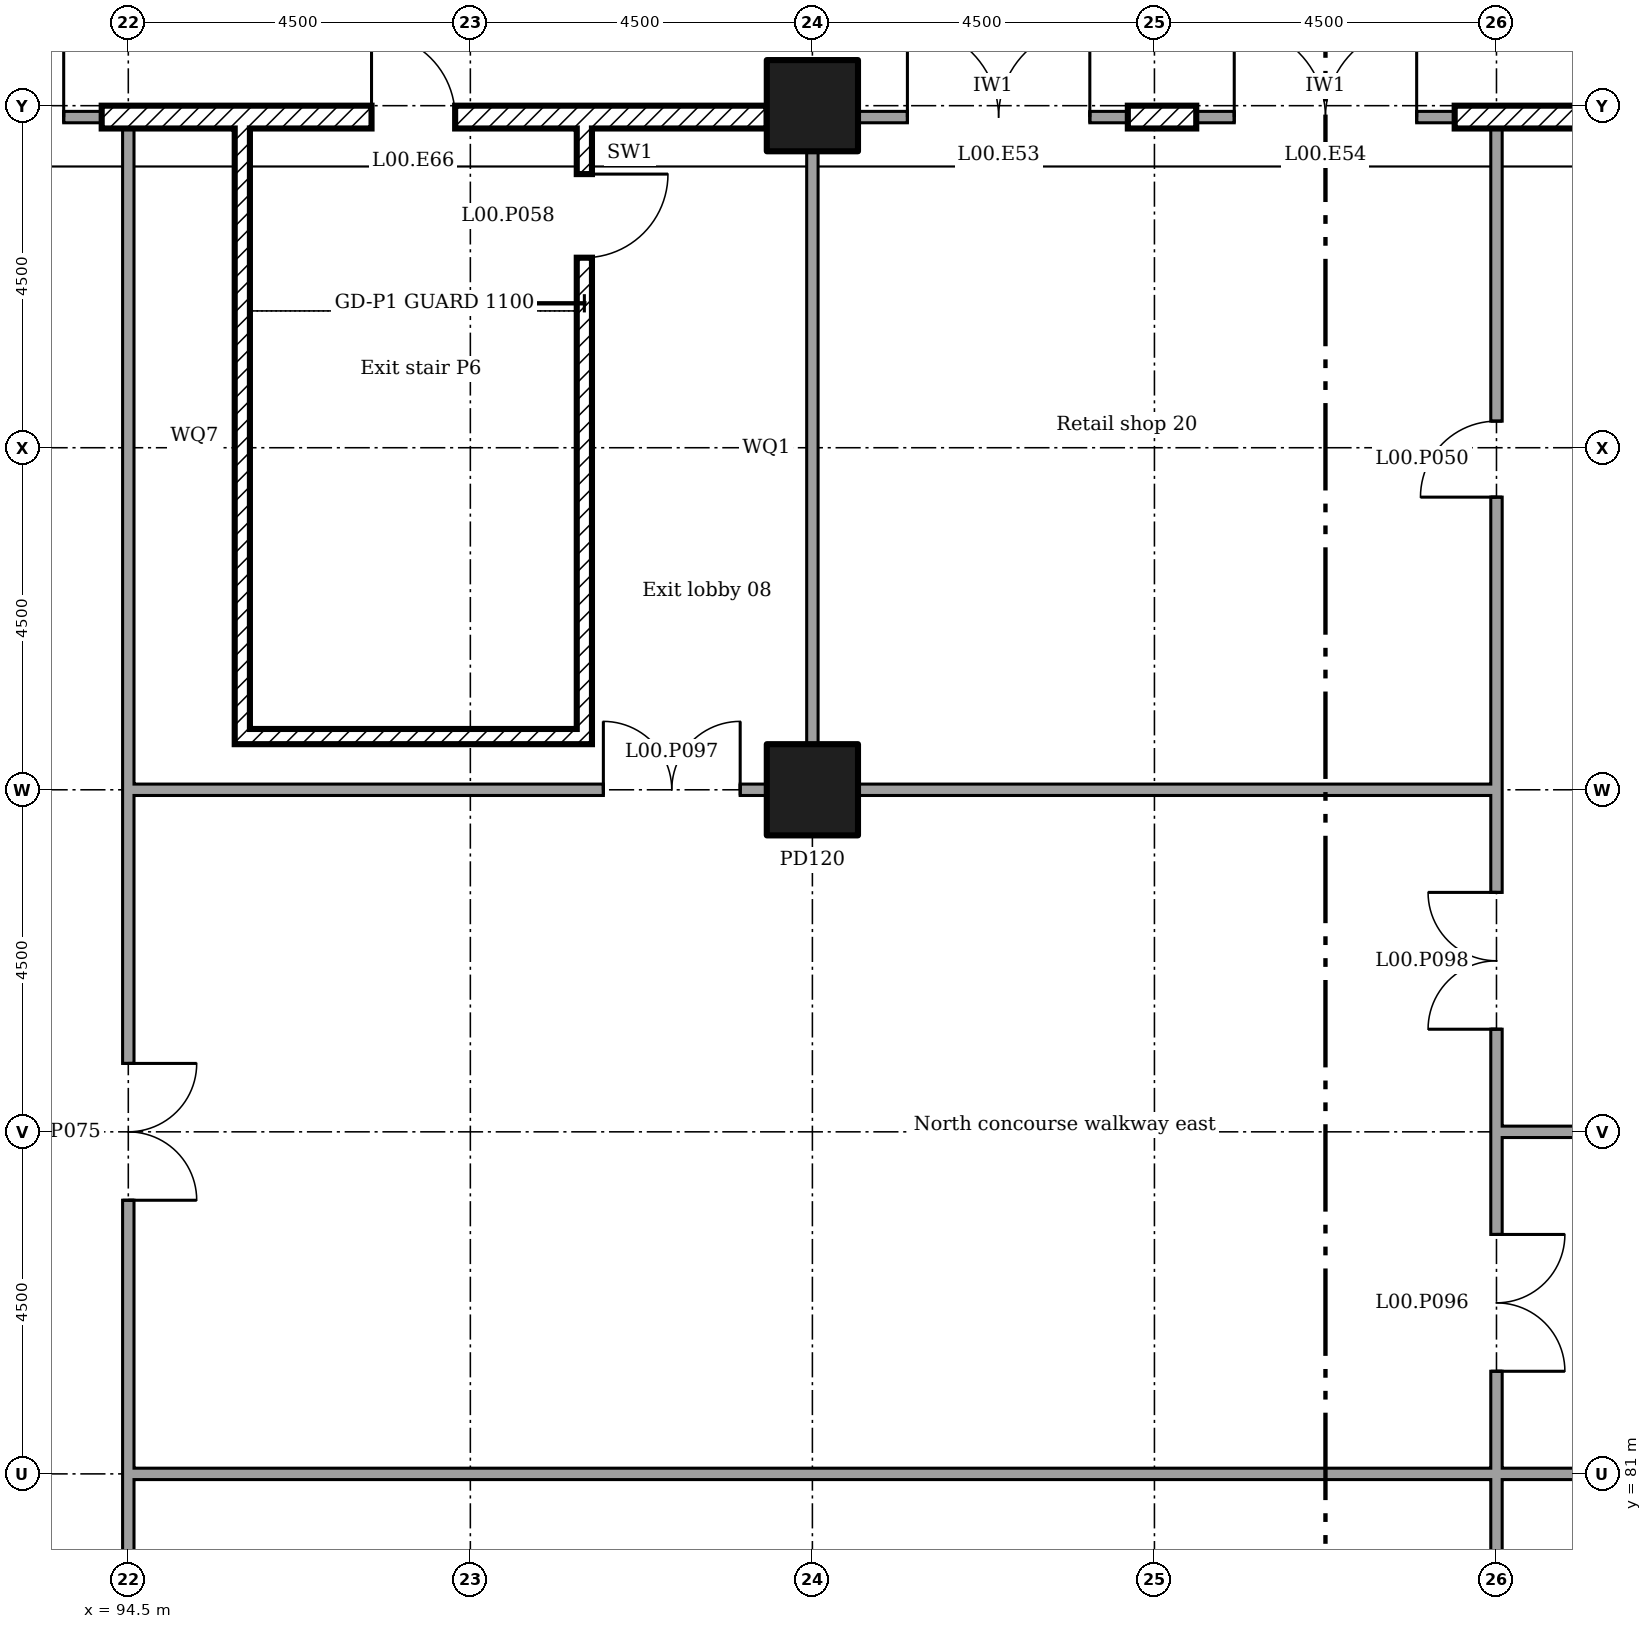
"""IFC4 building model, lengths in metres.
Left out: names, types, materials, properties, quantities, classifications, styles, units other than length and angle.
Written with IfcOpenShell. Run it as: python <this file> out.ifc"""

import sys

from ifc_helpers import new_model, si_unit, direction, frame, frame_2d, origin, origin_2d, place, context, subcontext, project, spatial, rectangle, extrude, element, fill, save


model = new_model("IFC4")
c1 = context("Model", 3, precision=1e-05, world=origin(), true_north=direction((0.0, 1.0)))
c2 = subcontext(c1, "Body", "Model", "MODEL_VIEW")
j1 = project(units=[si_unit("LENGTHUNIT", "METRE"), si_unit("PLANEANGLEUNIT", "RADIAN")], contexts=[c1])
p1 = place(None, origin())
s1 = spatial("IfcSite", under=j1, at=p1, CompositionType="ELEMENT")
p2 = place(p1, origin())
s2 = spatial("IfcBuilding", under=s1, at=p2, CompositionType="ELEMENT")
p3 = place(p2, origin())
s3 = spatial("IfcBuildingStorey", under=s2, at=p3, CompositionType="ELEMENT", Elevation=0.0)
for number, where in (
    (1, (103.5, 90.0, 0.0)),
    (2, (103.5, 99.0, 0.0)),
):
    element("IfcColumn", number, at=place(p3, frame(where)), inside=s3, PredefinedType="COLUMN", context=c2, shape_type="SweptSolid", body=[
        extrude(rectangle(XDim=1.2, YDim=1.2, at=origin_2d()), origin(), (0.0, 0.0, 1.0), 6.0),
    ])
p4 = place(p3, frame((116.4, 98.85, 0.0), z_axis=(0.0, 0.0, 1.0), x_axis=(-1.0, 0.0, 0.0)))
e3 = element("IfcWall", 3, at=p4, inside=s3, PredefinedType="ELEMENTEDWALL", context=c2, shape_type="SweptSolid", body=[
    extrude(rectangle(XDim=4.45, YDim=0.3, at=frame_2d((2.225, 0.0))), origin(), (0.0, 0.0, 1.0), 5.55),
])
p5 = place(p3, frame((111.95, 98.85, 0.0), z_axis=(0.0, 0.0, 1.0), x_axis=(-1.0, 0.0, 0.0)))
e4 = element("IfcWall", 4, at=p5, inside=s3, PredefinedType="SOLIDWALL", context=c2, shape_type="SweptSolid", body=[
    extrude(rectangle(XDim=3.4, YDim=0.15, at=frame_2d((1.7, 0.0))), origin(), (0.0, 0.0, 1.0), 5.55),
])
p6 = place(p5, frame((0.5, 0.0, 0.0)))
e5 = element("IfcOpeningElement", 5, at=p6, cuts=e4, PredefinedType="OPENING", context=c2, shape_type="SweptSolid", body=[
    extrude(rectangle(XDim=2.4, YDim=2.7, at=frame_2d((1.2, 1.35))), frame((0.0, 0.085, 0.0), z_axis=(0.0, -1.0, 0.0), x_axis=(1.0, 0.0, 0.0)), (0.0, 0.0, 1.0), 0.17),
])
p7 = place(p3, frame((108.55, 98.85, 0.0), z_axis=(0.0, 0.0, 1.0), x_axis=(-1.0, 0.0, 0.0)))
e6 = element("IfcWall", 6, at=p7, inside=s3, PredefinedType="ELEMENTEDWALL", context=c2, shape_type="SweptSolid", body=[
    extrude(rectangle(XDim=0.9, YDim=0.3, at=frame_2d((0.45, 0.0))), origin(), (0.0, 0.0, 1.0), 5.55),
])
p8 = place(p3, frame((107.65, 98.85, 0.0), z_axis=(0.0, 0.0, 1.0), x_axis=(-1.0, 0.0, 0.0)))
e7 = element("IfcWall", 7, at=p8, inside=s3, PredefinedType="SOLIDWALL", context=c2, shape_type="SweptSolid", body=[
    extrude(rectangle(XDim=3.55, YDim=0.15, at=frame_2d((1.775, 0.0))), origin(), (0.0, 0.0, 1.0), 5.55),
])
p9 = place(p8, frame((0.5, 0.0, 0.0)))
e8 = element("IfcOpeningElement", 8, at=p9, cuts=e7, PredefinedType="OPENING", context=c2, shape_type="SweptSolid", body=[
    extrude(rectangle(XDim=2.4, YDim=2.7, at=frame_2d((1.2, 1.35))), frame((0.0, 0.085, 0.0), z_axis=(0.0, -1.0, 0.0), x_axis=(1.0, 0.0, 0.0)), (0.0, 0.0, 1.0), 0.17),
])
p10 = place(p3, frame((102.9, 98.85, 0.0), z_axis=(0.0, 0.0, 1.0), x_axis=(-1.0, 0.0, 0.0)))
e9 = element("IfcWall", 9, at=p10, inside=s3, PredefinedType="ELEMENTEDWALL", context=c2, shape_type="SweptSolid", body=[
    extrude(rectangle(XDim=3.6, YDim=0.3, at=frame_2d((1.8, 0.0))), origin(), (0.0, 0.0, 1.0), 5.55),
])
p11 = place(p3, frame((99.3, 98.85, 0.0), z_axis=(0.0, 0.0, 1.0), x_axis=(-1.0, 0.0, 0.0)))
e10 = element("IfcWall", 10, at=p11, inside=s3, PredefinedType="ELEMENTEDWALL", context=c2, shape_type="SweptSolid", body=[
    extrude(rectangle(XDim=2.1, YDim=0.3, at=frame_2d((1.05, 0.0))), origin(), (0.0, 0.0, 1.0), 5.55),
])
p12 = place(p11, frame((0.5, 0.0, 0.0)))
e11 = element("IfcOpeningElement", 11, at=p12, cuts=e10, PredefinedType="OPENING", context=c2, shape_type="SweptSolid", body=[
    extrude(rectangle(XDim=1.1, YDim=2.4, at=frame_2d((0.55, 1.2))), frame((0.0, 0.16, 0.0), z_axis=(0.0, -1.0, 0.0), x_axis=(1.0, 0.0, 0.0)), (0.0, 0.0, 1.0), 0.32),
])
p13 = place(p3, frame((97.2, 98.85, 0.0), z_axis=(0.0, 0.0, 1.0), x_axis=(-1.0, 0.0, 0.0)))
e12 = element("IfcWall", 12, at=p13, inside=s3, PredefinedType="ELEMENTEDWALL", context=c2, shape_type="SweptSolid", body=[
    extrude(rectangle(XDim=3.05, YDim=0.3, at=frame_2d((1.525, 0.0))), origin(), (0.0, 0.0, 1.0), 5.55),
])
p14 = place(p3, frame((94.15, 98.85, 0.0), z_axis=(0.0, 0.0, 1.0), x_axis=(-1.0, 0.0, 0.0)))
e13 = element("IfcWall", 13, at=p14, inside=s3, PredefinedType="SOLIDWALL", context=c2, shape_type="SweptSolid", body=[
    extrude(rectangle(XDim=3.55, YDim=0.15, at=frame_2d((1.775, 0.0))), origin(), (0.0, 0.0, 1.0), 5.55),
])
p15 = place(p14, frame((0.5, 0.0, 0.0)))
e14 = element("IfcOpeningElement", 14, at=p15, cuts=e13, PredefinedType="OPENING", context=c2, shape_type="SweptSolid", body=[
    extrude(rectangle(XDim=2.4, YDim=2.7, at=frame_2d((1.2, 1.35))), frame((0.0, 0.085, 0.0), z_axis=(0.0, -1.0, 0.0), x_axis=(1.0, 0.0, 0.0)), (0.0, 0.0, 1.0), 0.17),
])
p16 = place(p3, frame((94.5, 76.5, 0.0), z_axis=(0.0, 0.0, 1.0), x_axis=(0.0, 1.0, 0.0)))
e15 = element("IfcWall", 15, at=p16, inside=s3, PredefinedType="PARTITIONING", context=c2, shape_type="SweptSolid", body=[
    extrude(rectangle(XDim=4.575, YDim=0.15, at=frame_2d((2.288, 0.0))), origin(), (0.0, 0.0, 1.0), 5.55),
])
p17 = place(p3, frame((94.5, 81.0, 0.0), z_axis=(0.0, 0.0, 1.0), x_axis=(0.0, 1.0, 0.0)))
e16 = element("IfcWall", 16, at=p17, inside=s3, PredefinedType="PARTITIONING", context=c2, shape_type="SweptSolid", body=[
    extrude(rectangle(XDim=9.075, YDim=0.15, at=frame_2d((4.538, 0.0))), origin(), (0.0, 0.0, 1.0), 5.55),
])
p18 = place(p17, frame((3.6, 0.0, 0.0)))
e17 = element("IfcOpeningElement", 17, at=p18, cuts=e16, PredefinedType="OPENING", context=c2, shape_type="SweptSolid", body=[
    extrude(rectangle(XDim=1.8, YDim=2.1, at=frame_2d((0.9, 1.05))), frame((0.0, 0.085, 0.0), z_axis=(0.0, -1.0, 0.0), x_axis=(1.0, 0.0, 0.0)), (0.0, 0.0, 1.0), 0.17),
])
p19 = place(p3, frame((94.5, 90.0, 0.0), z_axis=(0.0, 0.0, 1.0), x_axis=(0.0, 1.0, 0.0)))
e18 = element("IfcWall", 18, at=p19, inside=s3, PredefinedType="PARTITIONING", context=c2, shape_type="SweptSolid", body=[
    extrude(rectangle(XDim=8.7, YDim=0.15, at=frame_2d((4.35, 0.0))), origin(), (0.0, 0.0, 1.0), 5.55),
])
p20 = place(p3, frame((112.5, 59.495, 0.0), z_axis=(0.0, 0.0, 1.0), x_axis=(0.0, 1.0, 0.0)))
e19 = element("IfcWall", 19, at=p20, inside=s3, PredefinedType="PARTITIONING", context=c2, shape_type="SweptSolid", body=[
    extrude(rectangle(XDim=21.58, YDim=0.15, at=frame_2d((10.79, 0.0))), origin(), (0.0, 0.0, 1.0), 5.55),
])
p21 = place(p3, frame((94.575, 81.0, 0.0)))
e20 = element("IfcWall", 20, at=p21, inside=s3, PredefinedType="PARTITIONING", context=c2, shape_type="SweptSolid", body=[
    extrude(rectangle(XDim=17.85, YDim=0.15, at=frame_2d((8.925, 0.0))), origin(), (0.0, 0.0, 1.0), 5.55),
])
p22 = place(p3, frame((112.425, 81.0, 0.0)))
e21 = element("IfcWall", 21, at=p22, inside=s3, PredefinedType="PARTITIONING", context=c2, shape_type="SweptSolid", body=[
    extrude(rectangle(XDim=22.5, YDim=0.15, at=frame_2d((11.25, 0.0))), origin(), (0.0, 0.0, 1.0), 5.55),
])
p23 = place(p3, frame((112.5, 81.075, 0.0), z_axis=(0.0, 0.0, 1.0), x_axis=(0.0, 1.0, 0.0)))
e22 = element("IfcWall", 22, at=p23, inside=s3, PredefinedType="PARTITIONING", context=c2, shape_type="SweptSolid", body=[
    extrude(rectangle(XDim=4.5, YDim=0.15, at=frame_2d((2.25, 0.0))), origin(), (0.0, 0.0, 1.0), 5.55),
])
p24 = place(p23, frame((1.275, 0.0, 0.0)))
e23 = element("IfcOpeningElement", 23, at=p24, cuts=e22, PredefinedType="OPENING", context=c2, shape_type="SweptSolid", body=[
    extrude(rectangle(XDim=1.8, YDim=2.1, at=frame_2d((0.9, 1.05))), frame((0.0, 0.085, 0.0), z_axis=(0.0, -1.0, 0.0), x_axis=(1.0, 0.0, 0.0)), (0.0, 0.0, 1.0), 0.17),
])
p25 = place(p3, frame((94.575, 90.0, 0.0)))
e24 = element("IfcWall", 24, at=p25, inside=s3, PredefinedType="PARTITIONING", context=c2, shape_type="SweptSolid", body=[
    extrude(rectangle(XDim=8.33, YDim=0.15, at=frame_2d((4.165, 0.0))), origin(), (0.0, 0.0, 1.0), 5.55),
])
p26 = place(p25, frame((6.175, 0.0, 0.0)))
e25 = element("IfcOpeningElement", 25, at=p26, cuts=e24, PredefinedType="OPENING", context=c2, shape_type="SweptSolid", body=[
    extrude(rectangle(XDim=1.8, YDim=2.1, at=frame_2d((0.9, 1.05))), frame((0.0, 0.085, 0.0), z_axis=(0.0, -1.0, 0.0), x_axis=(1.0, 0.0, 0.0)), (0.0, 0.0, 1.0), 0.17),
])
p27 = place(p3, frame((104.095, 90.0, 0.0)))
e26 = element("IfcWall", 26, at=p27, inside=s3, PredefinedType="PARTITIONING", context=c2, shape_type="SweptSolid", body=[
    extrude(rectangle(XDim=8.48, YDim=0.15, at=frame_2d((4.24, 0.0))), origin(), (0.0, 0.0, 1.0), 5.55),
])
p28 = place(p3, frame((112.5, 85.5, 0.0), z_axis=(0.0, 0.0, 1.0), x_axis=(0.0, 1.0, 0.0)))
e27 = element("IfcWall", 27, at=p28, inside=s3, PredefinedType="PARTITIONING", context=c2, shape_type="SweptSolid", body=[
    extrude(rectangle(XDim=4.425, YDim=0.15, at=frame_2d((2.212, 0.0))), origin(), (0.0, 0.0, 1.0), 5.55),
])
p29 = place(p28, frame((1.35, 0.0, 0.0)))
e28 = element("IfcOpeningElement", 28, at=p29, cuts=e27, PredefinedType="OPENING", context=c2, shape_type="SweptSolid", body=[
    extrude(rectangle(XDim=1.8, YDim=2.1, at=frame_2d((0.9, 1.05))), frame((0.0, 0.085, 0.0), z_axis=(0.0, -1.0, 0.0), x_axis=(1.0, 0.0, 0.0)), (0.0, 0.0, 1.0), 0.17),
])
p30 = place(p3, frame((112.575, 85.5, 0.0)))
e29 = element("IfcWall", 29, at=p30, inside=s3, PredefinedType="PARTITIONING", context=c2, shape_type="SweptSolid", body=[
    extrude(rectangle(XDim=18.0, YDim=0.15, at=frame_2d((9.0, 0.0))), origin(), (0.0, 0.0, 1.0), 5.55),
])
p31 = place(p30, frame((8.025, 0.0, 0.0)))
e30 = element("IfcOpeningElement", 30, at=p31, cuts=e29, PredefinedType="OPENING", context=c2, shape_type="SweptSolid", body=[
    extrude(rectangle(XDim=1.8, YDim=2.1, at=frame_2d((0.9, 1.05))), frame((0.0, 0.085, 0.0), z_axis=(0.0, -1.0, 0.0), x_axis=(1.0, 0.0, 0.0)), (0.0, 0.0, 1.0), 0.17),
])
p32 = place(p3, frame((103.5, 90.595, 0.0), z_axis=(0.0, 0.0, 1.0), x_axis=(0.0, 1.0, 0.0)))
e31 = element("IfcWall", 31, at=p32, inside=s3, PredefinedType="PARTITIONING", context=c2, shape_type="SweptSolid", body=[
    extrude(rectangle(XDim=7.81, YDim=0.15, at=frame_2d((3.905, 0.0))), origin(), (0.0, 0.0, 1.0), 5.55),
])
p33 = place(p3, frame((96.0, 90.6, 0.0), z_axis=(0.0, 0.0, 1.0), x_axis=(0.0, 1.0, 0.0)))
e32 = element("IfcWall", 32, at=p33, inside=s3, PredefinedType="SOLIDWALL", context=c2, shape_type="SweptSolid", body=[
    extrude(rectangle(XDim=8.1, YDim=0.2, at=frame_2d((4.05, 0.0))), origin(), (0.0, 0.0, 1.0), 5.55),
])
p34 = place(p3, frame((100.5, 90.6, 0.0), z_axis=(0.0, 0.0, 1.0), x_axis=(0.0, 1.0, 0.0)))
e33 = element("IfcWall", 33, at=p34, inside=s3, PredefinedType="SOLIDWALL", context=c2, shape_type="SweptSolid", body=[
    extrude(rectangle(XDim=8.1, YDim=0.2, at=frame_2d((4.05, 0.0))), origin(), (0.0, 0.0, 1.0), 5.55),
])
p35 = place(p34, frame((6.4, 0.0, 0.0)))
e34 = element("IfcOpeningElement", 34, at=p35, cuts=e33, PredefinedType="OPENING", context=c2, shape_type="SweptSolid", body=[
    extrude(rectangle(XDim=1.1, YDim=2.1, at=frame_2d((0.55, 1.05))), frame((0.0, 0.11, 0.0), z_axis=(0.0, -1.0, 0.0), x_axis=(1.0, 0.0, 0.0)), (0.0, 0.0, 1.0), 0.22),
])
p36 = place(p3, frame((96.1, 90.7, 0.0)))
e35 = element("IfcWall", 35, at=p36, inside=s3, PredefinedType="SOLIDWALL", context=c2, shape_type="SweptSolid", body=[
    extrude(rectangle(XDim=4.3, YDim=0.2, at=frame_2d((2.15, 0.0))), origin(), (0.0, 0.0, 1.0), 5.55),
])
p37 = place(p3, frame((112.5, 90.0, 0.0), z_axis=(0.0, 0.0, 1.0), x_axis=(0.0, 1.0, 0.0)))
e36 = element("IfcWall", 36, at=p37, inside=s3, PredefinedType="PARTITIONING", context=c2, shape_type="SweptSolid", body=[
    extrude(rectangle(XDim=8.7, YDim=0.15, at=frame_2d((4.35, 0.0))), origin(), (0.0, 0.0, 1.0), 5.55),
])
p38 = place(p37, frame((3.85, 0.0, 0.0)))
e37 = element("IfcOpeningElement", 37, at=p38, cuts=e36, PredefinedType="OPENING", context=c2, shape_type="SweptSolid", body=[
    extrude(rectangle(XDim=1.0, YDim=2.1, at=frame_2d((0.5, 1.05))), frame((0.0, 0.085, 0.0), z_axis=(0.0, -1.0, 0.0), x_axis=(1.0, 0.0, 0.0)), (0.0, 0.0, 1.0), 0.17),
])
p39 = place(p6, frame((2.4, 0.0, 0.0), x_axis=(-1.0, 0.0, 0.0)))
e38 = element("IfcDoor", 38, at=p39, inside=s3, OperationType="DOUBLE_DOOR_DOUBLE_SWING", PredefinedType="NOTDEFINED", context=c2, shape_type="SweptSolid", body=[
    extrude(rectangle(XDim=2.4, YDim=2.7, at=frame_2d((1.2, 1.35))), frame((0.0, 0.025, 0.0), z_axis=(0.0, -1.0, 0.0), x_axis=(1.0, 0.0, 0.0)), (0.0, 0.0, 1.0), 0.05),
])
fill(e5, e38)
p40 = place(p9, frame((2.4, 0.0, 0.0), x_axis=(-1.0, 0.0, 0.0)))
e39 = element("IfcDoor", 39, at=p40, inside=s3, OperationType="DOUBLE_DOOR_DOUBLE_SWING", PredefinedType="NOTDEFINED", context=c2, shape_type="SweptSolid", body=[
    extrude(rectangle(XDim=2.4, YDim=2.7, at=frame_2d((1.2, 1.35))), frame((0.0, 0.025, 0.0), z_axis=(0.0, -1.0, 0.0), x_axis=(1.0, 0.0, 0.0)), (0.0, 0.0, 1.0), 0.05),
])
fill(e8, e39)
p41 = place(p12, frame((1.1, 0.0, 0.0), x_axis=(-1.0, 0.0, 0.0)))
e40 = element("IfcDoor", 40, at=p41, inside=s3, OperationType="SINGLE_SWING_RIGHT", PredefinedType="NOTDEFINED", context=c2, shape_type="SweptSolid", body=[
    extrude(rectangle(XDim=1.1, YDim=2.4, at=frame_2d((0.55, 1.2))), frame((0.0, 0.025, 0.0), z_axis=(0.0, -1.0, 0.0), x_axis=(1.0, 0.0, 0.0)), (0.0, 0.0, 1.0), 0.05),
])
fill(e11, e40)
p42 = place(p15, frame((2.4, 0.0, 0.0), x_axis=(-1.0, 0.0, 0.0)))
e41 = element("IfcDoor", 41, at=p42, inside=s3, OperationType="DOUBLE_DOOR_DOUBLE_SWING", PredefinedType="NOTDEFINED", context=c2, shape_type="SweptSolid", body=[
    extrude(rectangle(XDim=2.4, YDim=2.7, at=frame_2d((1.2, 1.35))), frame((0.0, 0.025, 0.0), z_axis=(0.0, -1.0, 0.0), x_axis=(1.0, 0.0, 0.0)), (0.0, 0.0, 1.0), 0.05),
])
fill(e14, e41)
p43 = place(p38, origin())
e42 = element("IfcDoor", 42, at=p43, inside=s3, OperationType="SINGLE_SWING_RIGHT", PredefinedType="DOOR", context=c2, shape_type="SweptSolid", body=[
    extrude(rectangle(XDim=1.0, YDim=2.1, at=frame_2d((0.5, 1.05))), frame((0.0, 0.025, 0.0), z_axis=(0.0, -1.0, 0.0), x_axis=(1.0, 0.0, 0.0)), (0.0, 0.0, 1.0), 0.05),
])
fill(e37, e42)
p44 = place(p35, frame((1.1, 0.0, 0.0), x_axis=(-1.0, 0.0, 0.0)))
e43 = element("IfcDoor", 43, at=p44, inside=s3, OperationType="SINGLE_SWING_RIGHT", PredefinedType="DOOR", context=c2, shape_type="SweptSolid", body=[
    extrude(rectangle(XDim=1.1, YDim=2.1, at=frame_2d((0.55, 1.05))), frame((0.0, 0.025, 0.0), z_axis=(0.0, -1.0, 0.0), x_axis=(1.0, 0.0, 0.0)), (0.0, 0.0, 1.0), 0.05),
])
fill(e34, e43)
p45 = place(p18, frame((1.8, 0.0, 0.0), x_axis=(-1.0, 0.0, 0.0)))
e44 = element("IfcDoor", 44, at=p45, inside=s3, OperationType="DOUBLE_DOOR_SINGLE_SWING", PredefinedType="DOOR", context=c2, shape_type="SweptSolid", body=[
    extrude(rectangle(XDim=1.8, YDim=2.1, at=frame_2d((0.9, 1.05))), frame((0.0, 0.025, 0.0), z_axis=(0.0, -1.0, 0.0), x_axis=(1.0, 0.0, 0.0)), (0.0, 0.0, 1.0), 0.05),
])
fill(e17, e44)
p46 = place(p24, frame((1.8, 0.0, 0.0), x_axis=(-1.0, 0.0, 0.0)))
e45 = element("IfcDoor", 45, at=p46, inside=s3, OperationType="DOUBLE_DOOR_SINGLE_SWING", PredefinedType="DOOR", context=c2, shape_type="SweptSolid", body=[
    extrude(rectangle(XDim=1.8, YDim=2.1, at=frame_2d((0.9, 1.05))), frame((0.0, 0.025, 0.0), z_axis=(0.0, -1.0, 0.0), x_axis=(1.0, 0.0, 0.0)), (0.0, 0.0, 1.0), 0.05),
])
fill(e23, e45)
p47 = place(p26, origin())
e46 = element("IfcDoor", 46, at=p47, inside=s3, OperationType="DOUBLE_DOOR_SINGLE_SWING", PredefinedType="DOOR", context=c2, shape_type="SweptSolid", body=[
    extrude(rectangle(XDim=1.8, YDim=2.1, at=frame_2d((0.9, 1.05))), frame((0.0, 0.025, 0.0), z_axis=(0.0, -1.0, 0.0), x_axis=(1.0, 0.0, 0.0)), (0.0, 0.0, 1.0), 0.05),
])
fill(e25, e46)
p48 = place(p29, origin())
e47 = element("IfcDoor", 47, at=p48, inside=s3, OperationType="DOUBLE_DOOR_SINGLE_SWING", PredefinedType="DOOR", context=c2, shape_type="SweptSolid", body=[
    extrude(rectangle(XDim=1.8, YDim=2.1, at=frame_2d((0.9, 1.05))), frame((0.0, 0.025, 0.0), z_axis=(0.0, -1.0, 0.0), x_axis=(1.0, 0.0, 0.0)), (0.0, 0.0, 1.0), 0.05),
])
fill(e28, e47)
save(model, sys.argv[1])
